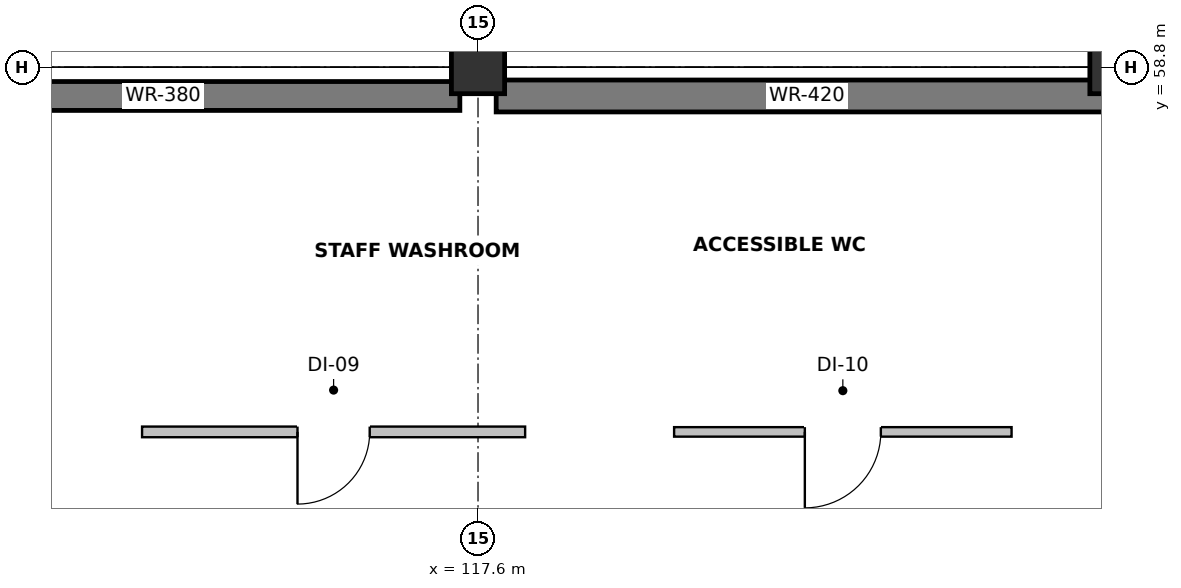
"""IFC4 building model, lengths in metres.
Left out: names, types, materials, properties, quantities, classifications, styles, units other than length and angle.
Written with IfcOpenShell. Run it as: python <this file> out.ifc"""

import sys

from ifc_helpers import new_model, si_unit, direction, frame, frame_2d, origin, origin_2d, place, context, subcontext, project, spatial, rectangle, extrude, element, fill, save


model = new_model("IFC4")
c1 = context("Model", 3, precision=1e-05, world=origin(), true_north=direction((0.0, 1.0)))
c2 = subcontext(c1, "Body", "Model", "MODEL_VIEW")
j1 = project(units=[si_unit("LENGTHUNIT", "METRE"), si_unit("PLANEANGLEUNIT", "RADIAN")], contexts=[c1])
p1 = place(None, origin())
s1 = spatial("IfcSite", under=j1, at=p1, CompositionType="ELEMENT")
p2 = place(p1, origin())
s2 = spatial("IfcBuilding", under=s1, at=p2, CompositionType="ELEMENT")
p3 = place(p2, frame((0.0, 0.0, -4.8)))
s3 = spatial("IfcBuildingStorey", under=s2, at=p3, CompositionType="ELEMENT", Elevation=-4.8)
for number, where, z_axis, x_axis in (
    (1, (117.6, 58.8, 0.0), (0.0, 0.0, 1.0), (1.0, 0.0, 0.0)),
    (2, (126.0, 58.8, 0.0), (0.0, 0.0, 1.0), (1.0, 0.0, 0.0)),
):
    element("IfcColumn", number, at=place(p3, frame(where, z_axis=z_axis, x_axis=x_axis)), inside=s3, PredefinedType="COLUMN", context=c2, shape_type="SweptSolid", body=[
        extrude(rectangle(XDim=0.7, YDim=0.7, at=origin_2d()), origin(), (0.0, 0.0, 1.0), 4.8),
    ])
p4 = place(p3, frame((109.552, 58.42, 0.0), z_axis=(0.0, 0.0, 1.0), x_axis=(1.0, 0.0, 0.0)))
e3 = element("IfcWall", 3, at=p4, inside=s3, PredefinedType="USERDEFINED", context=c2, shape_type="SweptSolid", body=[
    extrude(rectangle(XDim=7.809, YDim=0.38, at=frame_2d((3.904, 0.0))), origin(), (0.0, 0.0, 1.0), 3.75),
])
p5 = place(p3, frame((117.839, 58.42, 0.0), z_axis=(0.0, 0.0, 1.0), x_axis=(1.0, 0.0, 0.0)))
e4 = element("IfcWall", 4, at=p5, inside=s3, PredefinedType="USERDEFINED", context=c2, shape_type="SweptSolid", body=[
    extrude(rectangle(XDim=8.176, YDim=0.42, at=frame_2d((4.088, 0.0))), origin(), (0.0, 0.0, 1.0), 3.75),
])
p6 = place(p3, frame((118.22, 54.0, 0.0), z_axis=(0.0, 0.0, 1.0), x_axis=(-1.0, 0.0, 0.0)))
e5 = element("IfcWall", 5, at=p6, inside=s3, PredefinedType="PARTITIONING", context=c2, shape_type="SweptSolid", body=[
    extrude(rectangle(XDim=5.04, YDim=0.14, at=frame_2d((2.52, 0.0))), origin(), (0.0, 0.0, 1.0), 4.5),
])
p7 = place(p6, frame((2.045, 0.0, 0.0)))
e6 = element("IfcOpeningElement", 6, at=p7, cuts=e5, PredefinedType="OPENING", context=c2, shape_type="SweptSolid", body=[
    extrude(rectangle(XDim=0.95, YDim=2.1, at=frame_2d((0.475, 1.05))), frame((0.0, 0.082, 0.0), z_axis=(0.0, -1.0, 0.0), x_axis=(1.0, 0.0, 0.0)), (0.0, 0.0, 1.0), 0.164),
])
p8 = place(p3, frame((124.62, 54.0, 0.0), z_axis=(0.0, 0.0, 1.0), x_axis=(-1.0, 0.0, 0.0)))
e7 = element("IfcWall", 7, at=p8, inside=s3, PredefinedType="PARTITIONING", context=c2, shape_type="SweptSolid", body=[
    extrude(rectangle(XDim=4.44, YDim=0.125, at=frame_2d((2.22, 0.0))), origin(), (0.0, 0.0, 1.0), 4.5),
])
p9 = place(p8, frame((1.72, 0.0, 0.0)))
e8 = element("IfcOpeningElement", 8, at=p9, cuts=e7, PredefinedType="OPENING", context=c2, shape_type="SweptSolid", body=[
    extrude(rectangle(XDim=1.0, YDim=2.1, at=frame_2d((0.5, 1.05))), frame((0.0, 0.074, 0.0), z_axis=(0.0, -1.0, 0.0), x_axis=(1.0, 0.0, 0.0)), (0.0, 0.0, 1.0), 0.149),
])
p10 = place(p7, origin())
e9 = element("IfcDoor", 9, at=p10, inside=s3, OperationType="SINGLE_SWING_RIGHT", PredefinedType="DOOR", context=c2, shape_type="SweptSolid", body=[
    extrude(rectangle(XDim=0.95, YDim=2.1, at=frame_2d((0.475, 1.05))), frame((0.0, 0.025, 0.0), z_axis=(0.0, -1.0, 0.0), x_axis=(1.0, 0.0, 0.0)), (0.0, 0.0, 1.0), 0.05),
])
fill(e6, e9)
p11 = place(p9, origin())
e10 = element("IfcDoor", 10, at=p11, inside=s3, OperationType="SINGLE_SWING_RIGHT", PredefinedType="DOOR", context=c2, shape_type="SweptSolid", body=[
    extrude(rectangle(XDim=1.0, YDim=2.1, at=frame_2d((0.5, 1.05))), frame((0.0, 0.025, 0.0), z_axis=(0.0, -1.0, 0.0), x_axis=(1.0, 0.0, 0.0)), (0.0, 0.0, 1.0), 0.05),
])
fill(e8, e10)
save(model, sys.argv[1])
